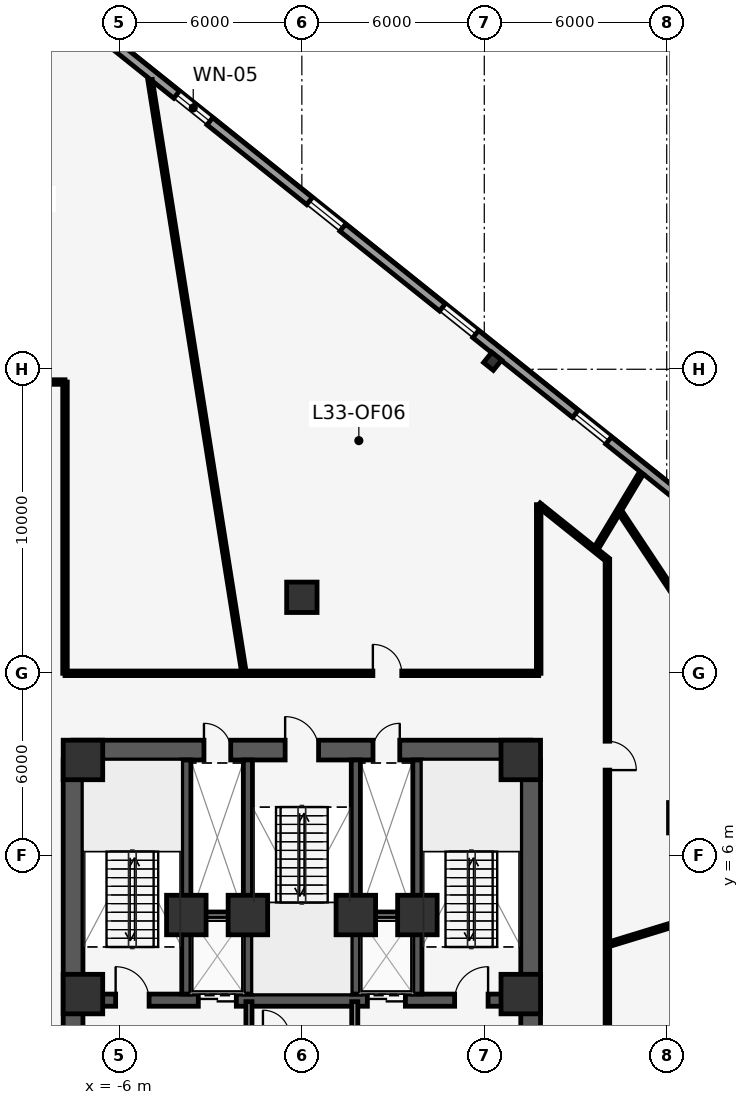
"""IFC4 building model, lengths in metres.
Left out: names, types, materials, properties, quantities, classifications, styles, units other than length and angle.
Written with IfcOpenShell. Run it as: python <this file> out.ifc"""

import sys

from ifc_helpers import new_model, si_unit, direction, frame, frame_2d, origin, origin_2d, place, context, subcontext, project, spatial, rectangle, i_section, extrude, element, fill, save


model = new_model("IFC4")
c1 = context("Model", 3, precision=1e-05, world=origin(), true_north=direction((0.0, 1.0)))
c2 = subcontext(c1, "Body", "Model", "MODEL_VIEW")
j1 = project(units=[si_unit("LENGTHUNIT", "METRE"), si_unit("PLANEANGLEUNIT", "RADIAN")], contexts=[c1])
p1 = place(None, origin())
s1 = spatial("IfcSite", under=j1, at=p1, CompositionType="ELEMENT")
p2 = place(p1, origin())
s2 = spatial("IfcBuilding", under=s1, at=p2, CompositionType="ELEMENT")
p3 = place(p2, frame((0.0, 0.0, 144.5)))
s3 = spatial("IfcBuildingStorey", under=s2, at=p3, CompositionType="ELEMENT", Elevation=144.5)
p4 = place(p3, frame((-7.525, 9.475, 0.0), z_axis=(0.0, 0.0, 1.0), x_axis=(1.0, 0.0, 0.0)))
e1 = element("IfcWall", 1, at=p4, inside=s3, PredefinedType="SHEAR", context=c2, shape_type="SweptSolid", body=[
    extrude(rectangle(XDim=15.05, YDim=0.65, at=frame_2d((7.525, 0.0))), origin(), (0.0, 0.0, 1.0), 3.85),
])
p5 = place(p4, frame((6.975, 0.0, 0.0)))
e2 = element("IfcOpeningElement", 2, at=p5, cuts=e1, PredefinedType="OPENING", context=c2, shape_type="SweptSolid", body=[
    extrude(rectangle(XDim=1.1, YDim=2.15, at=frame_2d((0.55, 1.075))), frame((0.0, 0.335, 0.0), z_axis=(0.0, -1.0, 0.0), x_axis=(1.0, 0.0, 0.0)), (0.0, 0.0, 1.0), 0.67),
])
p6 = place(p4, frame((4.305, 0.0, 0.0)))
e3 = element("IfcOpeningElement", 3, at=p6, cuts=e1, PredefinedType="OPENING", context=c2, shape_type="SweptSolid", body=[
    extrude(rectangle(XDim=0.88, YDim=2.15, at=frame_2d((0.44, 1.075))), frame((0.0, 0.335, 0.0), z_axis=(0.0, -1.0, 0.0), x_axis=(1.0, 0.0, 0.0)), (0.0, 0.0, 1.0), 0.67),
])
p7 = place(p4, frame((9.865, 0.0, 0.0)))
e4 = element("IfcOpeningElement", 4, at=p7, cuts=e1, PredefinedType="OPENING", context=c2, shape_type="SweptSolid", body=[
    extrude(rectangle(XDim=0.88, YDim=2.15, at=frame_2d((0.44, 1.075))), frame((0.0, 0.335, 0.0), z_axis=(0.0, -1.0, 0.0), x_axis=(1.0, 0.0, 0.0)), (0.0, 0.0, 1.0), 0.67),
])
p8 = place(p3, frame((-7.2, 1.25, 0.0), z_axis=(0.0, 0.0, 1.0), x_axis=(1.0, 0.0, 0.0)))
e5 = element("IfcWall", 5, at=p8, inside=s3, PredefinedType="SHEAR", context=c2, shape_type="SweptSolid", body=[
    extrude(rectangle(XDim=14.4, YDim=0.4, at=frame_2d((7.2, 0.0))), origin(), (0.0, 0.0, 1.0), 3.85),
])
p9 = place(p8, frame((3.795, 0.0, 0.0)))
e6 = element("IfcOpeningElement", 6, at=p9, cuts=e5, PredefinedType="OPENING", context=c2, shape_type="SweptSolid", body=[
    extrude(rectangle(XDim=1.25, YDim=2.25, at=frame_2d((0.625, 1.125))), frame((0.0, 0.21, 0.0), z_axis=(0.0, -1.0, 0.0), x_axis=(1.0, 0.0, 0.0)), (0.0, 0.0, 1.0), 0.42),
])
p10 = place(p8, frame((9.355, 0.0, 0.0)))
e7 = element("IfcOpeningElement", 7, at=p10, cuts=e5, PredefinedType="OPENING", context=c2, shape_type="SweptSolid", body=[
    extrude(rectangle(XDim=1.25, YDim=2.25, at=frame_2d((0.625, 1.125))), frame((0.0, 0.21, 0.0), z_axis=(0.0, -1.0, 0.0), x_axis=(1.0, 0.0, 0.0)), (0.0, 0.0, 1.0), 0.42),
])
p11 = place(p8, frame((1.075, 0.0, 0.0)))
e8 = element("IfcOpeningElement", 8, at=p11, cuts=e5, PredefinedType="OPENING", context=c2, shape_type="SweptSolid", body=[
    extrude(rectangle(XDim=1.1, YDim=2.15, at=frame_2d((0.55, 1.075))), frame((0.0, 0.21, 0.0), z_axis=(0.0, -1.0, 0.0), x_axis=(1.0, 0.0, 0.0)), (0.0, 0.0, 1.0), 0.42),
])
p12 = place(p8, frame((12.225, 0.0, 0.0)))
e9 = element("IfcOpeningElement", 9, at=p12, cuts=e5, PredefinedType="OPENING", context=c2, shape_type="SweptSolid", body=[
    extrude(rectangle(XDim=1.1, YDim=2.15, at=frame_2d((0.55, 1.075))), frame((0.0, 0.21, 0.0), z_axis=(0.0, -1.0, 0.0), x_axis=(1.0, 0.0, 0.0)), (0.0, 0.0, 1.0), 0.42),
])
for number, where, z_axis, x_axis in (
    (10, (-3.8, 1.45, 0.0), (0.0, 0.0, 1.0), (0.0, 1.0, 0.0)),
    (11, (-1.775, 1.45, 0.0), (0.0, 0.0, 1.0), (0.0, 1.0, 0.0)),
    (12, (1.775, 1.45, 0.0), (0.0, 0.0, 1.0), (0.0, 1.0, 0.0)),
    (13, (3.8, 1.45, 0.0), (0.0, 0.0, 1.0), (0.0, 1.0, 0.0)),
):
    element("IfcWall", number, at=place(p3, frame(where, z_axis=z_axis, x_axis=x_axis)), inside=s3, PredefinedType="SHEAR", context=c2, shape_type="SweptSolid", body=[
        extrude(rectangle(XDim=7.7, YDim=0.3, at=frame_2d((3.85, 0.0))), origin(), (0.0, 0.0, 1.0), 3.85),
    ])
for number, where, z_axis, x_axis in (
    (14, (-7.525, 0.1, 0.0), (0.0, 0.0, 1.0), (0.0, 1.0, 0.0)),
    (15, (7.525, 0.1, 0.0), (0.0, 0.0, 1.0), (0.0, 1.0, 0.0)),
):
    element("IfcWall", number, at=place(p3, frame(where, z_axis=z_axis, x_axis=x_axis)), inside=s3, PredefinedType="SHEAR", context=c2, shape_type="SweptSolid", body=[
        extrude(rectangle(XDim=9.05, YDim=0.65, at=frame_2d((4.525, 0.0))), origin(), (0.0, 0.0, 1.0), 3.85),
    ])
for number, where, z_axis, x_axis in (
    (16, (7.2, 1.45, 0.0), (0.0, 0.0, 1.0), (1.0, 0.0, 0.0)),
    (17, (7.2, 9.15, 0.0), (0.0, 0.0, 1.0), (1.0, 0.0, 0.0)),
    (18, (-7.2, 9.15, 0.0), (0.0, 0.0, 1.0), (1.0, 0.0, 0.0)),
    (19, (-7.2, 1.45, 0.0), (0.0, 0.0, 1.0), (1.0, 0.0, 0.0)),
    (20, (-3.8, 4.05, 0.0), (0.0, 0.0, 1.0), (1.0, 0.0, 0.0)),
    (21, (3.8, 4.05, 0.0), (0.0, 0.0, 1.0), (1.0, 0.0, 0.0)),
    (22, (-1.775, 4.05, 0.0), (0.0, 0.0, 1.0), (1.0, 0.0, 0.0)),
    (23, (1.775, 4.05, 0.0), (0.0, 0.0, 1.0), (1.0, 0.0, 0.0)),
):
    element("IfcColumn", number, at=place(p3, frame(where, z_axis=z_axis, x_axis=x_axis)), inside=s3, PredefinedType="COLUMN", context=c2, shape_type="SweptSolid", body=[
        extrude(rectangle(XDim=1.3, YDim=1.3, at=origin_2d()), origin(), (0.0, 0.0, 1.0), 4.1),
    ])
for number, where, z_axis, x_axis in (
    (24, (12.56, 7.25, 0.0), (0.0, 0.0, 1.0), (1.0, 0.0, 0.0)),
    (25, (0.0, 14.5, 0.0), (0.0, 0.0, 1.0), (1.0, 0.0, 0.0)),
):
    element("IfcColumn", number, at=place(p3, frame(where, z_axis=z_axis, x_axis=x_axis)), inside=s3, PredefinedType="COLUMN", context=c2, shape_type="SweptSolid", body=[
        extrude(rectangle(XDim=1.0, YDim=1.0, at=origin_2d()), origin(), (0.0, 0.0, 1.0), 4.1),
    ])
p13 = place(p3, frame((6.273, 22.262, 0.0), z_axis=(0.0, 0.0, 1.0), x_axis=(-0.780757676633, 0.624833938242, 0.0)))
e26 = element("IfcColumn", 26, at=p13, inside=s3, PredefinedType="COLUMN", context=c2, shape_type="SweptSolid", body=[
    extrude(i_section(OverallWidth=0.411, OverallDepth=0.434, WebThickness=0.036, FlangeThickness=0.057, at=origin_2d()), origin(), (0.0, 0.0, 1.0), 4.1),
])
p14 = place(p3, frame((-8.762, 34.748, 0.0), z_axis=(0.0, 0.0, 1.0), x_axis=(0.780669916438, -0.624943582708, 0.0)))
e27 = element("IfcWall", 27, at=p14, inside=s3, PredefinedType="STANDARD", context=c2, shape_type="SweptSolid", body=[
    extrude(rectangle(XDim=58.093, YDim=0.3, at=frame_2d((29.046, 0.0))), origin(), (0.0, 0.0, 1.0), 3.85),
])
p15 = place(p14, frame((5.947, 0.0, 0.85)))
e28 = element("IfcOpeningElement", 28, at=p15, cuts=e27, PredefinedType="OPENING", context=c2, shape_type="SweptSolid", body=[
    extrude(rectangle(XDim=1.4, YDim=2.2, at=frame_2d((0.7, 1.1))), frame((0.0, 0.16, 0.0), z_axis=(0.0, -1.0, 0.0), x_axis=(1.0, 0.0, 0.0)), (0.0, 0.0, 1.0), 0.32),
])
p16 = place(p14, frame((11.547, 0.0, 0.85)))
e29 = element("IfcOpeningElement", 29, at=p16, cuts=e27, PredefinedType="OPENING", context=c2, shape_type="SweptSolid", body=[
    extrude(rectangle(XDim=1.4, YDim=2.2, at=frame_2d((0.7, 1.1))), frame((0.0, 0.16, 0.0), z_axis=(0.0, -1.0, 0.0), x_axis=(1.0, 0.0, 0.0)), (0.0, 0.0, 1.0), 0.32),
])
p17 = place(p14, frame((17.146, 0.0, 0.85)))
e30 = element("IfcOpeningElement", 30, at=p17, cuts=e27, PredefinedType="OPENING", context=c2, shape_type="SweptSolid", body=[
    extrude(rectangle(XDim=1.4, YDim=2.2, at=frame_2d((0.7, 1.1))), frame((0.0, 0.16, 0.0), z_axis=(0.0, -1.0, 0.0), x_axis=(1.0, 0.0, 0.0)), (0.0, 0.0, 1.0), 0.32),
])
p18 = place(p14, frame((22.747, 0.0, 0.85)))
e31 = element("IfcOpeningElement", 31, at=p18, cuts=e27, PredefinedType="OPENING", context=c2, shape_type="SweptSolid", body=[
    extrude(rectangle(XDim=1.4, YDim=2.2, at=frame_2d((0.7, 1.1))), frame((0.0, 0.16, 0.0), z_axis=(0.0, -1.0, 0.0), x_axis=(1.0, 0.0, 0.0)), (0.0, 0.0, 1.0), 0.32),
])
p19 = place(p14, frame((28.347, 0.0, 0.85)))
e32 = element("IfcOpeningElement", 32, at=p19, cuts=e27, PredefinedType="OPENING", context=c2, shape_type="SweptSolid", body=[
    extrude(rectangle(XDim=1.4, YDim=2.2, at=frame_2d((0.7, 1.1))), frame((0.0, 0.16, 0.0), z_axis=(0.0, -1.0, 0.0), x_axis=(1.0, 0.0, 0.0)), (0.0, 0.0, 1.0), 0.32),
])
p20 = place(p14, frame((33.947, 0.0, 0.85)))
e33 = element("IfcOpeningElement", 33, at=p20, cuts=e27, PredefinedType="OPENING", context=c2, shape_type="SweptSolid", body=[
    extrude(rectangle(XDim=1.4, YDim=2.2, at=frame_2d((0.7, 1.1))), frame((0.0, 0.16, 0.0), z_axis=(0.0, -1.0, 0.0), x_axis=(1.0, 0.0, 0.0)), (0.0, 0.0, 1.0), 0.32),
])
p21 = place(p14, frame((39.547, 0.0, 0.85)))
e34 = element("IfcOpeningElement", 34, at=p21, cuts=e27, PredefinedType="OPENING", context=c2, shape_type="SweptSolid", body=[
    extrude(rectangle(XDim=1.4, YDim=2.2, at=frame_2d((0.7, 1.1))), frame((0.0, 0.16, 0.0), z_axis=(0.0, -1.0, 0.0), x_axis=(1.0, 0.0, 0.0)), (0.0, 0.0, 1.0), 0.32),
])
p22 = place(p14, frame((45.146, 0.0, 0.85)))
e35 = element("IfcOpeningElement", 35, at=p22, cuts=e27, PredefinedType="OPENING", context=c2, shape_type="SweptSolid", body=[
    extrude(rectangle(XDim=1.4, YDim=2.2, at=frame_2d((0.7, 1.1))), frame((0.0, 0.16, 0.0), z_axis=(0.0, -1.0, 0.0), x_axis=(1.0, 0.0, 0.0)), (0.0, 0.0, 1.0), 0.32),
])
p23 = place(p14, frame((50.747, 0.0, 0.85)))
e36 = element("IfcOpeningElement", 36, at=p23, cuts=e27, PredefinedType="OPENING", context=c2, shape_type="SweptSolid", body=[
    extrude(rectangle(XDim=1.4, YDim=2.2, at=frame_2d((0.7, 1.1))), frame((0.0, 0.16, 0.0), z_axis=(0.0, -1.0, 0.0), x_axis=(1.0, 0.0, 0.0)), (0.0, 0.0, 1.0), 0.32),
])
for number, where, z_axis, x_axis in (
    (37, (-3.65, 4.05, 0.0), (0.0, 0.0, 1.0), (1.0, 0.0, 0.0)),
    (38, (1.92, 4.05, 0.0), (0.0, 0.0, 1.0), (1.0, 0.0, 0.0)),
):
    element("IfcWall", number, at=place(p3, frame(where, z_axis=z_axis, x_axis=x_axis)), inside=s3, PredefinedType="PARTITIONING", context=c2, shape_type="SweptSolid", body=[
        extrude(rectangle(XDim=1.73, YDim=0.2, at=frame_2d((0.865, 0.0))), origin(), (0.0, 0.0, 1.0), 3.85),
    ])
p24 = place(p3, frame((-1.74, -1.78, 0.0), z_axis=(0.0, 0.0, 1.0), x_axis=(0.0, 1.0, 0.0)))
e39 = element("IfcWall", 39, at=p24, inside=s3, PredefinedType="PARTITIONING", context=c2, shape_type="SweptSolid", body=[
    extrude(rectangle(XDim=2.98, YDim=0.2, at=frame_2d((1.49, 0.0))), origin(), (0.0, 0.0, 1.0), 3.85),
])
p25 = place(p24, frame((0.42, 0.0, 0.0)))
e40 = element("IfcOpeningElement", 40, at=p25, cuts=e39, PredefinedType="OPENING", context=c2, shape_type="SweptSolid", body=[
    extrude(rectangle(XDim=0.88, YDim=2.15, at=frame_2d((0.44, 1.075))), frame((0.0, 0.11, 0.0), z_axis=(0.0, -1.0, 0.0), x_axis=(1.0, 0.0, 0.0)), (0.0, 0.0, 1.0), 0.22),
])
p26 = place(p3, frame((1.74, -1.78, 0.0), z_axis=(0.0, 0.0, 1.0), x_axis=(0.0, 1.0, 0.0)))
e41 = element("IfcWall", 41, at=p26, inside=s3, PredefinedType="PARTITIONING", context=c2, shape_type="SweptSolid", body=[
    extrude(rectangle(XDim=2.98, YDim=0.2, at=frame_2d((1.49, 0.0))), origin(), (0.0, 0.0, 1.0), 3.85),
])
p27 = place(p26, frame((0.42, 0.0, 0.0)))
e42 = element("IfcOpeningElement", 42, at=p27, cuts=e41, PredefinedType="OPENING", context=c2, shape_type="SweptSolid", body=[
    extrude(rectangle(XDim=0.88, YDim=2.15, at=frame_2d((0.44, 1.075))), frame((0.0, 0.11, 0.0), z_axis=(0.0, -1.0, 0.0), x_axis=(1.0, 0.0, 0.0)), (0.0, 0.0, 1.0), 0.22),
])
p28 = place(p3, frame((-10.05, 21.58, 0.0), z_axis=(0.0, 0.0, 1.0), x_axis=(1.0, 0.0, 0.0)))
e43 = element("IfcWall", 43, at=p28, inside=s3, PredefinedType="PARTITIONING", context=c2, shape_type="SweptSolid", body=[
    extrude(rectangle(XDim=2.26, YDim=0.15, at=frame_2d((1.13, 0.0))), origin(), (0.0, 0.0, 1.0), 3.85),
])
p29 = place(p3, frame((-7.79, 21.58, 0.0), z_axis=(0.0, 0.0, 1.0), x_axis=(0.0, -1.0, 0.0)))
e44 = element("IfcWall", 44, at=p29, inside=s3, PredefinedType="PARTITIONING", context=c2, shape_type="SweptSolid", body=[
    extrude(rectangle(XDim=9.58, YDim=0.15, at=frame_2d((4.79, 0.0))), origin(), (0.0, 0.0, 1.0), 3.85),
])
p30 = place(p3, frame((-7.79, 12.0, 0.0), z_axis=(0.0, 0.0, 1.0), x_axis=(1.0, 0.0, 0.0)))
e45 = element("IfcWall", 45, at=p30, inside=s3, PredefinedType="PARTITIONING", context=c2, shape_type="SweptSolid", body=[
    extrude(rectangle(XDim=15.58, YDim=0.15, at=frame_2d((7.79, 0.0))), origin(), (0.0, 0.0, 1.0), 3.85),
])
p31 = place(p30, frame((10.125, 0.0, 0.0)))
e46 = element("IfcOpeningElement", 46, at=p31, cuts=e45, PredefinedType="OPENING", context=c2, shape_type="SweptSolid", body=[
    extrude(rectangle(XDim=0.95, YDim=2.15, at=frame_2d((0.475, 1.075))), frame((0.0, 0.085, 0.0), z_axis=(0.0, -1.0, 0.0), x_axis=(1.0, 0.0, 0.0)), (0.0, 0.0, 1.0), 0.17),
])
p32 = place(p3, frame((7.79, 12.0, 0.0), z_axis=(0.0, 0.0, 1.0), x_axis=(0.0, 1.0, 0.0)))
e47 = element("IfcWall", 47, at=p32, inside=s3, PredefinedType="PARTITIONING", context=c2, shape_type="SweptSolid", body=[
    extrude(rectangle(XDim=5.547, YDim=0.15, at=frame_2d((2.773, 0.0))), origin(), (0.0, 0.0, 1.0), 3.85),
])
p33 = place(p3, frame((7.79, 17.547, 0.0), z_axis=(0.0, 0.0, 1.0), x_axis=(0.780646621428, -0.624972681366, 0.0)))
e48 = element("IfcWall", 48, at=p33, inside=s3, PredefinedType="PARTITIONING", context=c2, shape_type="SweptSolid", body=[
    extrude(rectangle(XDim=2.895, YDim=0.15, at=frame_2d((1.448, 0.0))), origin(), (0.0, 0.0, 1.0), 3.85),
])
p34 = place(p3, frame((10.05, 15.737, 0.0), z_axis=(0.0, 0.0, 1.0), x_axis=(0.0, -1.0, 0.0)))
e49 = element("IfcWall", 49, at=p34, inside=s3, PredefinedType="PARTITIONING", context=c2, shape_type="SweptSolid", body=[
    extrude(rectangle(XDim=15.607, YDim=0.15, at=frame_2d((7.804, 0.0))), origin(), (0.0, 0.0, 1.0), 3.85),
])
p35 = place(p34, frame((5.971, 0.0, 0.0)))
e50 = element("IfcOpeningElement", 50, at=p35, cuts=e49, PredefinedType="OPENING", context=c2, shape_type="SweptSolid", body=[
    extrude(rectangle(XDim=0.95, YDim=2.15, at=frame_2d((0.475, 1.075))), frame((0.0, 0.085, 0.0), z_axis=(0.0, -1.0, 0.0), x_axis=(1.0, 0.0, 0.0)), (0.0, 0.0, 1.0), 0.17),
])
p36 = place(p3, frame((10.155, 3.105, 0.0), z_axis=(0.0, 0.0, 1.0), x_axis=(0.956304415169, 0.292372819408, 0.0)))
e51 = element("IfcWall", 51, at=p36, inside=s3, PredefinedType="PARTITIONING", context=c2, shape_type="SweptSolid", body=[
    extrude(rectangle(XDim=15.397, YDim=0.15, at=frame_2d((7.699, 0.0))), origin(), (0.0, 0.0, 1.0), 3.85),
])
p37 = place(p3, frame((9.704, 16.149, 0.0), z_axis=(0.0, 0.0, 1.0), x_axis=(0.515051836846, 0.857159031547, 0.0)))
e52 = element("IfcWall", 52, at=p37, inside=s3, PredefinedType="PARTITIONING", context=c2, shape_type="SweptSolid", body=[
    extrude(rectangle(XDim=2.84, YDim=0.15, at=frame_2d((1.42, 0.0))), origin(), (0.0, 0.0, 1.0), 3.85),
])
p38 = place(p3, frame((-1.917, 12.105, 0.0), z_axis=(0.0, 0.0, 1.0), x_axis=(-0.156433889955, 0.98768843168, 0.0)))
e53 = element("IfcWall", 53, at=p38, inside=s3, PredefinedType="PARTITIONING", context=c2, shape_type="SweptSolid", body=[
    extrude(rectangle(XDim=19.656, YDim=0.15, at=frame_2d((9.828, 0.0))), origin(), (0.0, 0.0, 1.0), 2.898),
])
p39 = place(p3, frame((18.233, 5.6, 0.0), z_axis=(0.0, 0.0, 1.0), x_axis=(-0.552746716733, 0.833349306798, 0.0)))
e54 = element("IfcWall", 54, at=p39, inside=s3, PredefinedType="PARTITIONING", context=c2, shape_type="SweptSolid", body=[
    extrude(rectangle(XDim=14.085, YDim=0.15, at=frame_2d((7.043, 0.0))), origin(), (0.0, 0.0, 1.0), 3.85),
])
p40 = place(p39, frame((6.593, 0.0, 0.0)))
e55 = element("IfcOpeningElement", 55, at=p40, cuts=e54, PredefinedType="OPENING", context=c2, shape_type="SweptSolid", body=[
    extrude(rectangle(XDim=0.9, YDim=2.1, at=frame_2d((0.45, 1.05))), frame((0.0, 0.085, 0.0), z_axis=(0.0, -1.0, 0.0), x_axis=(1.0, 0.0, 0.0)), (0.0, 0.0, 1.0), 0.17),
])
p41 = place(p15, origin())
e56 = element("IfcWindow", 56, at=p41, inside=s3, PartitioningType="SINGLE_PANEL", PredefinedType="WINDOW", context=c2, shape_type="SweptSolid", body=[
    extrude(rectangle(XDim=1.4, YDim=2.2, at=frame_2d((0.7, 1.1))), frame((0.0, 0.03, 0.0), z_axis=(0.0, -1.0, 0.0), x_axis=(1.0, 0.0, 0.0)), (0.0, 0.0, 1.0), 0.06),
])
fill(e28, e56)
p42 = place(p16, origin())
e57 = element("IfcWindow", 57, at=p42, inside=s3, PartitioningType="SINGLE_PANEL", PredefinedType="WINDOW", context=c2, shape_type="SweptSolid", body=[
    extrude(rectangle(XDim=1.4, YDim=2.2, at=frame_2d((0.7, 1.1))), frame((0.0, 0.03, 0.0), z_axis=(0.0, -1.0, 0.0), x_axis=(1.0, 0.0, 0.0)), (0.0, 0.0, 1.0), 0.06),
])
fill(e29, e57)
p43 = place(p17, origin())
e58 = element("IfcWindow", 58, at=p43, inside=s3, PartitioningType="SINGLE_PANEL", PredefinedType="WINDOW", context=c2, shape_type="SweptSolid", body=[
    extrude(rectangle(XDim=1.4, YDim=2.2, at=frame_2d((0.7, 1.1))), frame((0.0, 0.03, 0.0), z_axis=(0.0, -1.0, 0.0), x_axis=(1.0, 0.0, 0.0)), (0.0, 0.0, 1.0), 0.06),
])
fill(e30, e58)
p44 = place(p18, origin())
e59 = element("IfcWindow", 59, at=p44, inside=s3, PartitioningType="SINGLE_PANEL", PredefinedType="WINDOW", context=c2, shape_type="SweptSolid", body=[
    extrude(rectangle(XDim=1.4, YDim=2.2, at=frame_2d((0.7, 1.1))), frame((0.0, 0.03, 0.0), z_axis=(0.0, -1.0, 0.0), x_axis=(1.0, 0.0, 0.0)), (0.0, 0.0, 1.0), 0.06),
])
fill(e31, e59)
p45 = place(p9, origin())
e60 = element("IfcDoor", 60, at=p45, inside=s3, OperationType="DOUBLE_DOOR_SLIDING", PredefinedType="DOOR", context=c2, shape_type="SweptSolid", body=[
    extrude(rectangle(XDim=1.25, YDim=2.25, at=frame_2d((0.625, 1.125))), frame((0.0, 0.025, 0.0), z_axis=(0.0, -1.0, 0.0), x_axis=(1.0, 0.0, 0.0)), (0.0, 0.0, 1.0), 0.05),
])
fill(e6, e60)
p46 = place(p10, origin())
e61 = element("IfcDoor", 61, at=p46, inside=s3, OperationType="DOUBLE_DOOR_SLIDING", PredefinedType="DOOR", context=c2, shape_type="SweptSolid", body=[
    extrude(rectangle(XDim=1.25, YDim=2.25, at=frame_2d((0.625, 1.125))), frame((0.0, 0.025, 0.0), z_axis=(0.0, -1.0, 0.0), x_axis=(1.0, 0.0, 0.0)), (0.0, 0.0, 1.0), 0.05),
])
fill(e7, e61)
p47 = place(p11, origin())
e62 = element("IfcDoor", 62, at=p47, inside=s3, OperationType="SINGLE_SWING_LEFT", PredefinedType="DOOR", context=c2, shape_type="SweptSolid", body=[
    extrude(rectangle(XDim=1.1, YDim=2.15, at=frame_2d((0.55, 1.075))), frame((0.0, 0.025, 0.0), z_axis=(0.0, -1.0, 0.0), x_axis=(1.0, 0.0, 0.0)), (0.0, 0.0, 1.0), 0.05),
])
fill(e8, e62)
p48 = place(p12, origin())
e63 = element("IfcDoor", 63, at=p48, inside=s3, OperationType="SINGLE_SWING_RIGHT", PredefinedType="DOOR", context=c2, shape_type="SweptSolid", body=[
    extrude(rectangle(XDim=1.1, YDim=2.15, at=frame_2d((0.55, 1.075))), frame((0.0, 0.025, 0.0), z_axis=(0.0, -1.0, 0.0), x_axis=(1.0, 0.0, 0.0)), (0.0, 0.0, 1.0), 0.05),
])
fill(e9, e63)
p49 = place(p5, origin())
e64 = element("IfcDoor", 64, at=p49, inside=s3, OperationType="SINGLE_SWING_LEFT", PredefinedType="DOOR", context=c2, shape_type="SweptSolid", body=[
    extrude(rectangle(XDim=1.1, YDim=2.15, at=frame_2d((0.55, 1.075))), frame((0.0, 0.025, 0.0), z_axis=(0.0, -1.0, 0.0), x_axis=(1.0, 0.0, 0.0)), (0.0, 0.0, 1.0), 0.05),
])
fill(e2, e64)
p50 = place(p6, origin())
e65 = element("IfcDoor", 65, at=p50, inside=s3, OperationType="SINGLE_SWING_LEFT", PredefinedType="DOOR", context=c2, shape_type="SweptSolid", body=[
    extrude(rectangle(XDim=0.88, YDim=2.15, at=frame_2d((0.44, 1.075))), frame((0.0, 0.025, 0.0), z_axis=(0.0, -1.0, 0.0), x_axis=(1.0, 0.0, 0.0)), (0.0, 0.0, 1.0), 0.05),
])
fill(e3, e65)
p51 = place(p7, origin())
e66 = element("IfcDoor", 66, at=p51, inside=s3, OperationType="SINGLE_SWING_RIGHT", PredefinedType="DOOR", context=c2, shape_type="SweptSolid", body=[
    extrude(rectangle(XDim=0.88, YDim=2.15, at=frame_2d((0.44, 1.075))), frame((0.0, 0.025, 0.0), z_axis=(0.0, -1.0, 0.0), x_axis=(1.0, 0.0, 0.0)), (0.0, 0.0, 1.0), 0.05),
])
fill(e4, e66)
p52 = place(p35, origin())
e67 = element("IfcDoor", 67, at=p52, inside=s3, OperationType="SINGLE_SWING_RIGHT", PredefinedType="DOOR", context=c2, shape_type="SweptSolid", body=[
    extrude(rectangle(XDim=0.95, YDim=2.15, at=frame_2d((0.475, 1.075))), frame((0.0, 0.025, 0.0), z_axis=(0.0, -1.0, 0.0), x_axis=(1.0, 0.0, 0.0)), (0.0, 0.0, 1.0), 0.05),
])
fill(e50, e67)
p53 = place(p31, origin())
e68 = element("IfcDoor", 68, at=p53, inside=s3, OperationType="SINGLE_SWING_LEFT", PredefinedType="DOOR", context=c2, shape_type="SweptSolid", body=[
    extrude(rectangle(XDim=0.95, YDim=2.15, at=frame_2d((0.475, 1.075))), frame((0.0, 0.025, 0.0), z_axis=(0.0, -1.0, 0.0), x_axis=(1.0, 0.0, 0.0)), (0.0, 0.0, 1.0), 0.05),
])
fill(e46, e68)
save(model, sys.argv[1])
